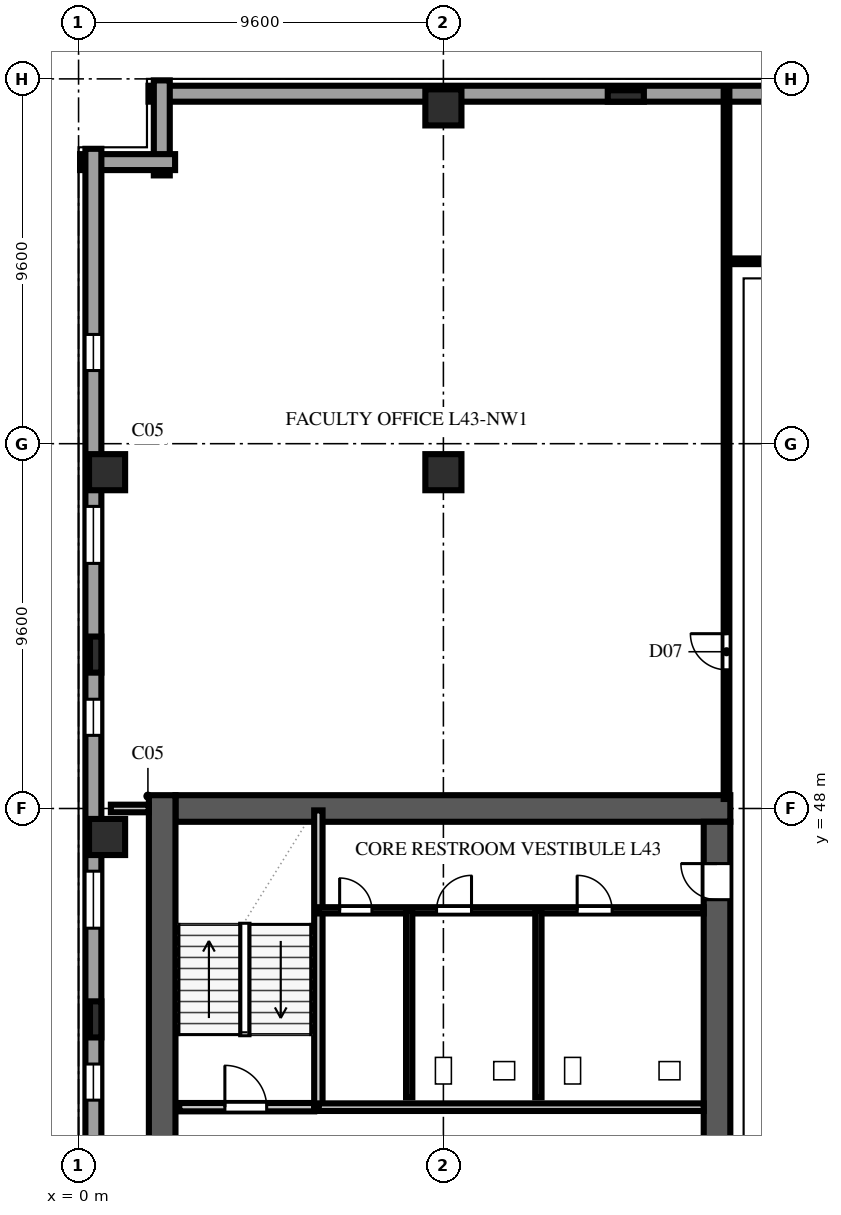
"""IFC4 building model, lengths in metres.
Left out: names, types, materials, properties, quantities, classifications, styles, units other than length and angle.
Written with IfcOpenShell. Run it as: python <this file> out.ifc"""

import sys

from ifc_helpers import new_model, si_unit, direction, frame, frame_2d, origin, origin_2d, place, context, subcontext, project, spatial, rectangle, extrude, element, fill, save


model = new_model("IFC4")
c1 = context("Model", 3, precision=1e-05, world=origin(), true_north=direction((0.0, 1.0)))
c2 = subcontext(c1, "Body", "Model", "MODEL_VIEW")
j1 = project(units=[si_unit("LENGTHUNIT", "METRE"), si_unit("PLANEANGLEUNIT", "RADIAN")], contexts=[c1])
p1 = place(None, origin())
s1 = spatial("IfcSite", under=j1, at=p1, CompositionType="ELEMENT")
p2 = place(p1, origin())
s2 = spatial("IfcBuilding", under=s1, at=p2, CompositionType="ELEMENT")
p3 = place(p2, frame((0.0, 0.0, 171.2)))
s3 = spatial("IfcBuildingStorey", under=s2, at=p3, CompositionType="ELEMENT", Elevation=171.2)
p4 = place(p3, frame((2.55, 48.0, 0.0), z_axis=(0.0, 0.0, 1.0), x_axis=(1.0, 0.0, 0.0)))
e1 = element("IfcWall", 1, at=p4, inside=s3, PredefinedType="SHEAR", context=c2, shape_type="SweptSolid", body=[
    extrude(rectangle(XDim=14.6, YDim=0.7, at=frame_2d((7.3, 0.0))), origin(), (0.0, 0.0, 1.0), 3.54),
])
p5 = place(p3, frame((2.2, 9.25, 0.0), z_axis=(0.0, 0.0, 1.0), x_axis=(0.0, 1.0, 0.0)))
e2 = element("IfcWall", 2, at=p5, inside=s3, PredefinedType="SHEAR", context=c2, shape_type="SweptSolid", body=[
    extrude(rectangle(XDim=39.1, YDim=0.7, at=frame_2d((19.55, 0.0))), origin(), (0.0, 0.0, 1.0), 3.54),
])
p6 = place(p3, frame((16.8, 36.4, 0.0), z_axis=(0.0, 0.0, 1.0), x_axis=(0.0, 1.0, 0.0)))
e3 = element("IfcWall", 3, at=p6, inside=s3, PredefinedType="SHEAR", context=c2, shape_type="SweptSolid", body=[
    extrude(rectangle(XDim=11.25, YDim=0.7, at=frame_2d((5.625, 0.0))), origin(), (0.0, 0.0, 1.0), 3.54),
])
p7 = place(p6, frame((9.2, 0.0, 0.0)))
e4 = element("IfcOpeningElement", 4, at=p7, cuts=e3, PredefinedType="OPENING", context=c2, shape_type="SweptSolid", body=[
    extrude(rectangle(XDim=0.95, YDim=2.15, at=frame_2d((0.475, 1.075))), frame((0.0, 0.362, 0.0), z_axis=(0.0, -1.0, 0.0), x_axis=(1.0, 0.0, 0.0)), (0.0, 0.0, 1.0), 0.724),
])
for number, where, z_axis, x_axis in (
    (5, (0.75, 47.25, 0.0), (0.0, 0.0, 1.0), (1.0, 0.0, 0.0)),
    (6, (0.75, 56.85, 0.0), (0.0, 0.0, 1.0), (1.0, 0.0, 0.0)),
    (7, (9.6, 56.85, 0.0), (0.0, 0.0, 1.0), (1.0, 0.0, 0.0)),
    (8, (9.6, 66.45, 0.0), (0.0, 0.0, 1.0), (1.0, 0.0, 0.0)),
):
    element("IfcColumn", number, at=place(p3, frame(where, z_axis=z_axis, x_axis=x_axis)), inside=s3, PredefinedType="COLUMN", context=c2, shape_type="SweptSolid", body=[
        extrude(rectangle(XDim=0.95, YDim=0.95, at=origin_2d()), origin(), (0.0, 0.0, 1.0), 3.8),
    ])
for number, where, z_axis, x_axis in (
    (9, (0.45, 42.45, 0.0), (0.0, 0.0, 1.0), (0.0, 1.0, 0.0)),
    (10, (0.45, 52.05, 0.0), (0.0, 0.0, 1.0), (0.0, 1.0, 0.0)),
    (11, (14.4, 66.75, 0.0), (0.0, 0.0, 1.0), (1.0, 0.0, 0.0)),
):
    element("IfcColumn", number, at=place(p3, frame(where, z_axis=z_axis, x_axis=x_axis)), inside=s3, PredefinedType="PILASTER", context=c2, shape_type="SweptSolid", body=[
        extrude(rectangle(XDim=0.95, YDim=0.3, at=origin_2d()), origin(), (0.0, 0.0, 1.0), 3.8),
    ])
p8 = place(p3, frame((36.56, 66.81, 0.0), z_axis=(0.0, 0.0, 1.0), x_axis=(-1.0, 0.0, 0.0)))
e12 = element("IfcWall", 12, at=p8, inside=s3, PredefinedType="SOLIDWALL", context=c2, shape_type="SweptSolid", body=[
    extrude(rectangle(XDim=34.72, YDim=0.42, at=frame_2d((17.36, 0.0))), origin(), (0.0, 0.0, 1.0), 3.54),
])
p9 = place(p8, frame((4.885, 0.0, 0.9)))
e13 = element("IfcOpeningElement", 13, at=p9, cuts=e12, PredefinedType="OPENING", context=c2, shape_type="SweptSolid", body=[
    extrude(rectangle(XDim=0.95, YDim=1.85, at=frame_2d((0.475, 0.925))), frame((0.0, 0.222, 0.0), z_axis=(0.0, -1.0, 0.0), x_axis=(1.0, 0.0, 0.0)), (0.0, 0.0, 1.0), 0.444),
])
p10 = place(p8, frame((9.41, 0.0, 0.9)))
e14 = element("IfcOpeningElement", 14, at=p10, cuts=e12, PredefinedType="OPENING", context=c2, shape_type="SweptSolid", body=[
    extrude(rectangle(XDim=1.5, YDim=1.85, at=frame_2d((0.75, 0.925))), frame((0.0, 0.222, 0.0), z_axis=(0.0, -1.0, 0.0), x_axis=(1.0, 0.0, 0.0)), (0.0, 0.0, 1.0), 0.444),
])
p11 = place(p8, frame((14.485, 0.0, 0.9)))
e15 = element("IfcOpeningElement", 15, at=p11, cuts=e12, PredefinedType="OPENING", context=c2, shape_type="SweptSolid", body=[
    extrude(rectangle(XDim=0.95, YDim=1.85, at=frame_2d((0.475, 0.925))), frame((0.0, 0.222, 0.0), z_axis=(0.0, -1.0, 0.0), x_axis=(1.0, 0.0, 0.0)), (0.0, 0.0, 1.0), 0.444),
])
for number, where, z_axis, x_axis in (
    (16, (2.19, 67.16, 0.0), (0.0, 0.0, 1.0), (0.0, -1.0, 0.0)),
    (17, (2.54, 65.01, 0.0), (0.0, 0.0, 1.0), (-1.0, 0.0, 0.0)),
):
    element("IfcWall", number, at=place(p3, frame(where, z_axis=z_axis, x_axis=x_axis)), inside=s3, PredefinedType="SOLIDWALL", context=c2, shape_type="SweptSolid", body=[
        extrude(rectangle(XDim=2.5, YDim=0.42, at=frame_2d((1.25, 0.0))), origin(), (0.0, 0.0, 1.0), 3.54),
    ])
p12 = place(p3, frame((0.39, 65.36, 0.0), z_axis=(0.0, 0.0, 1.0), x_axis=(0.0, -1.0, 0.0)))
e18 = element("IfcWall", 18, at=p12, inside=s3, PredefinedType="SOLIDWALL", context=c2, shape_type="SweptSolid", body=[
    extrude(rectangle(XDim=63.52, YDim=0.42, at=frame_2d((31.76, 0.0))), origin(), (0.0, 0.0, 1.0), 3.54),
])
p13 = place(p12, frame((4.885, 0.0, 0.9)))
e19 = element("IfcOpeningElement", 19, at=p13, cuts=e18, PredefinedType="OPENING", context=c2, shape_type="SweptSolid", body=[
    extrude(rectangle(XDim=0.95, YDim=1.85, at=frame_2d((0.475, 0.925))), frame((0.0, 0.222, 0.0), z_axis=(0.0, -1.0, 0.0), x_axis=(1.0, 0.0, 0.0)), (0.0, 0.0, 1.0), 0.444),
])
p14 = place(p12, frame((9.41, 0.0, 0.9)))
e20 = element("IfcOpeningElement", 20, at=p14, cuts=e18, PredefinedType="OPENING", context=c2, shape_type="SweptSolid", body=[
    extrude(rectangle(XDim=1.5, YDim=1.85, at=frame_2d((0.75, 0.925))), frame((0.0, 0.222, 0.0), z_axis=(0.0, -1.0, 0.0), x_axis=(1.0, 0.0, 0.0)), (0.0, 0.0, 1.0), 0.444),
])
p15 = place(p12, frame((14.485, 0.0, 0.9)))
e21 = element("IfcOpeningElement", 21, at=p15, cuts=e18, PredefinedType="OPENING", context=c2, shape_type="SweptSolid", body=[
    extrude(rectangle(XDim=0.95, YDim=1.85, at=frame_2d((0.475, 0.925))), frame((0.0, 0.222, 0.0), z_axis=(0.0, -1.0, 0.0), x_axis=(1.0, 0.0, 0.0)), (0.0, 0.0, 1.0), 0.444),
])
p16 = place(p12, frame((19.01, 0.0, 0.9)))
e22 = element("IfcOpeningElement", 22, at=p16, cuts=e18, PredefinedType="OPENING", context=c2, shape_type="SweptSolid", body=[
    extrude(rectangle(XDim=1.5, YDim=1.85, at=frame_2d((0.75, 0.925))), frame((0.0, 0.222, 0.0), z_axis=(0.0, -1.0, 0.0), x_axis=(1.0, 0.0, 0.0)), (0.0, 0.0, 1.0), 0.444),
])
p17 = place(p12, frame((24.085, 0.0, 0.9)))
e23 = element("IfcOpeningElement", 23, at=p17, cuts=e18, PredefinedType="OPENING", context=c2, shape_type="SweptSolid", body=[
    extrude(rectangle(XDim=0.95, YDim=1.85, at=frame_2d((0.475, 0.925))), frame((0.0, 0.222, 0.0), z_axis=(0.0, -1.0, 0.0), x_axis=(1.0, 0.0, 0.0)), (0.0, 0.0, 1.0), 0.444),
])
p18 = place(p12, frame((28.61, 0.0, 0.9)))
e24 = element("IfcOpeningElement", 24, at=p18, cuts=e18, PredefinedType="OPENING", context=c2, shape_type="SweptSolid", body=[
    extrude(rectangle(XDim=1.5, YDim=1.85, at=frame_2d((0.75, 0.925))), frame((0.0, 0.222, 0.0), z_axis=(0.0, -1.0, 0.0), x_axis=(1.0, 0.0, 0.0)), (0.0, 0.0, 1.0), 0.444),
])
p19 = place(p12, frame((33.685, 0.0, 0.9)))
e25 = element("IfcOpeningElement", 25, at=p19, cuts=e18, PredefinedType="OPENING", context=c2, shape_type="SweptSolid", body=[
    extrude(rectangle(XDim=0.95, YDim=1.85, at=frame_2d((0.475, 0.925))), frame((0.0, 0.222, 0.0), z_axis=(0.0, -1.0, 0.0), x_axis=(1.0, 0.0, 0.0)), (0.0, 0.0, 1.0), 0.444),
])
p20 = place(p12, frame((38.21, 0.0, 0.9)))
e26 = element("IfcOpeningElement", 26, at=p20, cuts=e18, PredefinedType="OPENING", context=c2, shape_type="SweptSolid", body=[
    extrude(rectangle(XDim=1.5, YDim=1.85, at=frame_2d((0.75, 0.925))), frame((0.0, 0.222, 0.0), z_axis=(0.0, -1.0, 0.0), x_axis=(1.0, 0.0, 0.0)), (0.0, 0.0, 1.0), 0.444),
])
p21 = place(p12, frame((43.285, 0.0, 0.9)))
e27 = element("IfcOpeningElement", 27, at=p21, cuts=e18, PredefinedType="OPENING", context=c2, shape_type="SweptSolid", body=[
    extrude(rectangle(XDim=0.95, YDim=1.85, at=frame_2d((0.475, 0.925))), frame((0.0, 0.222, 0.0), z_axis=(0.0, -1.0, 0.0), x_axis=(1.0, 0.0, 0.0)), (0.0, 0.0, 1.0), 0.444),
])
p22 = place(p12, frame((47.81, 0.0, 0.9)))
e28 = element("IfcOpeningElement", 28, at=p22, cuts=e18, PredefinedType="OPENING", context=c2, shape_type="SweptSolid", body=[
    extrude(rectangle(XDim=1.5, YDim=1.85, at=frame_2d((0.75, 0.925))), frame((0.0, 0.222, 0.0), z_axis=(0.0, -1.0, 0.0), x_axis=(1.0, 0.0, 0.0)), (0.0, 0.0, 1.0), 0.444),
])
p23 = place(p12, frame((52.885, 0.0, 0.9)))
e29 = element("IfcOpeningElement", 29, at=p23, cuts=e18, PredefinedType="OPENING", context=c2, shape_type="SweptSolid", body=[
    extrude(rectangle(XDim=0.95, YDim=1.85, at=frame_2d((0.475, 0.925))), frame((0.0, 0.222, 0.0), z_axis=(0.0, -1.0, 0.0), x_axis=(1.0, 0.0, 0.0)), (0.0, 0.0, 1.0), 0.444),
])
p24 = place(p12, frame((57.41, 0.0, 0.9)))
e30 = element("IfcOpeningElement", 30, at=p24, cuts=e18, PredefinedType="OPENING", context=c2, shape_type="SweptSolid", body=[
    extrude(rectangle(XDim=1.5, YDim=1.85, at=frame_2d((0.75, 0.925))), frame((0.0, 0.222, 0.0), z_axis=(0.0, -1.0, 0.0), x_axis=(1.0, 0.0, 0.0)), (0.0, 0.0, 1.0), 0.444),
])
p25 = place(p3, frame((2.65, 40.14, 0.0), z_axis=(0.0, 0.0, 1.0), x_axis=(1.0, 0.0, 0.0)))
e31 = element("IfcWall", 31, at=p25, inside=s3, PredefinedType="SOLIDWALL", context=c2, shape_type="SweptSolid", body=[
    extrude(rectangle(XDim=3.55, YDim=0.22, at=frame_2d((1.775, 0.0))), origin(), (0.0, 0.0, 1.0), 3.54),
])
p26 = place(p25, frame((1.2, 0.0, 0.0)))
e32 = element("IfcOpeningElement", 32, at=p26, cuts=e31, PredefinedType="OPENING", context=c2, shape_type="SweptSolid", body=[
    extrude(rectangle(XDim=1.1, YDim=2.2, at=frame_2d((0.55, 1.1))), frame((0.0, 0.122, 0.0), z_axis=(0.0, -1.0, 0.0), x_axis=(1.0, 0.0, 0.0)), (0.0, 0.0, 1.0), 0.244),
])
p27 = place(p3, frame((6.31, 40.14, 0.0), z_axis=(0.0, 0.0, 1.0), x_axis=(0.0, 1.0, 0.0)))
e33 = element("IfcWall", 33, at=p27, inside=s3, PredefinedType="SOLIDWALL", context=c2, shape_type="SweptSolid", body=[
    extrude(rectangle(XDim=7.81, YDim=0.22, at=frame_2d((3.905, 0.0))), origin(), (0.0, 0.0, 1.0), 3.54),
])
p28 = place(p3, frame((6.32, 40.14, 0.0), z_axis=(0.0, 0.0, 1.0), x_axis=(1.0, 0.0, 0.0)))
e34 = element("IfcWall", 34, at=p28, inside=s3, PredefinedType="SOLIDWALL", context=c2, shape_type="SweptSolid", body=[
    extrude(rectangle(XDim=10.13, YDim=0.2, at=frame_2d((5.065, 0.0))), origin(), (0.0, 0.0, 1.0), 3.54),
])
p29 = place(p3, frame((6.32, 45.32, 0.0), z_axis=(0.0, 0.0, 1.0), x_axis=(1.0, 0.0, 0.0)))
e35 = element("IfcWall", 35, at=p29, inside=s3, PredefinedType="PLUMBINGWALL", context=c2, shape_type="SweptSolid", body=[
    extrude(rectangle(XDim=10.13, YDim=0.165, at=frame_2d((5.065, 0.0))), origin(), (0.0, 0.0, 1.0), 3.54),
])
p30 = place(p29, frame((0.55, 0.0, 0.0)))
e36 = element("IfcOpeningElement", 36, at=p30, cuts=e35, PredefinedType="OPENING", context=c2, shape_type="SweptSolid", body=[
    extrude(rectangle(XDim=0.85, YDim=2.1, at=frame_2d((0.425, 1.05))), frame((0.0, 0.094, 0.0), z_axis=(0.0, -1.0, 0.0), x_axis=(1.0, 0.0, 0.0)), (0.0, 0.0, 1.0), 0.189),
])
p31 = place(p29, frame((3.1, 0.0, 0.0)))
e37 = element("IfcOpeningElement", 37, at=p31, cuts=e35, PredefinedType="OPENING", context=c2, shape_type="SweptSolid", body=[
    extrude(rectangle(XDim=0.92, YDim=2.15, at=frame_2d((0.46, 1.075))), frame((0.0, 0.094, 0.0), z_axis=(0.0, -1.0, 0.0), x_axis=(1.0, 0.0, 0.0)), (0.0, 0.0, 1.0), 0.189),
])
p32 = place(p29, frame((6.8, 0.0, 0.0)))
e38 = element("IfcOpeningElement", 38, at=p32, cuts=e35, PredefinedType="OPENING", context=c2, shape_type="SweptSolid", body=[
    extrude(rectangle(XDim=0.92, YDim=2.15, at=frame_2d((0.46, 1.075))), frame((0.0, 0.094, 0.0), z_axis=(0.0, -1.0, 0.0), x_axis=(1.0, 0.0, 0.0)), (0.0, 0.0, 1.0), 0.189),
])
for number, where, z_axis, x_axis in (
    (39, (8.7, 40.4, 0.0), (0.0, 0.0, 1.0), (0.0, 1.0, 0.0)),
    (40, (12.1, 40.4, 0.0), (0.0, 0.0, 1.0), (0.0, 1.0, 0.0)),
):
    element("IfcWall", number, at=place(p3, frame(where, z_axis=z_axis, x_axis=x_axis)), inside=s3, PredefinedType="PLUMBINGWALL", context=c2, shape_type="SweptSolid", body=[
        extrude(rectangle(XDim=4.92, YDim=0.165, at=frame_2d((2.46, 0.0))), origin(), (0.0, 0.0, 1.0), 3.54),
    ])
p33 = place(p3, frame((0.85, 48.0, 0.0), z_axis=(0.0, 0.0, 1.0), x_axis=(1.0, 0.0, 0.0)))
e41 = element("IfcWall", 41, at=p33, inside=s3, PredefinedType="SOLIDWALL", context=c2, shape_type="SweptSolid", body=[
    extrude(rectangle(XDim=0.995, YDim=0.2, at=frame_2d((0.498, 0.0))), origin(), (0.0, 0.0, 1.0), 3.54),
])
p34 = place(p3, frame((17.05, 62.4, 0.0), z_axis=(0.0, 0.0, 1.0), x_axis=(1.0, 0.0, 0.0)))
e42 = element("IfcWall", 42, at=p34, inside=s3, PredefinedType="PARTITIONING", context=c2, shape_type="SweptSolid", body=[
    extrude(rectangle(XDim=2.15, YDim=0.15, at=frame_2d((1.075, 0.0))), origin(), (0.0, 0.0, 1.0), 3.54),
])
p35 = place(p3, frame((17.05, 48.25, 0.0), z_axis=(0.0, 0.0, 1.0), x_axis=(0.0, 1.0, 0.0)))
e43 = element("IfcWall", 43, at=p35, inside=s3, PredefinedType="PARTITIONING", context=c2, shape_type="SweptSolid", body=[
    extrude(rectangle(XDim=18.73, YDim=0.15, at=frame_2d((9.365, 0.0))), origin(), (0.0, 0.0, 1.0), 3.54),
])
p36 = place(p35, frame((3.4, 0.0, 0.0)))
e44 = element("IfcOpeningElement", 44, at=p36, cuts=e43, PredefinedType="OPENING", context=c2, shape_type="SweptSolid", body=[
    extrude(rectangle(XDim=0.95, YDim=2.15, at=frame_2d((0.475, 1.075))), frame((0.0, 0.087, 0.0), z_axis=(0.0, -1.0, 0.0), x_axis=(1.0, 0.0, 0.0)), (0.0, 0.0, 1.0), 0.174),
])
p37 = place(p13, origin())
e45 = element("IfcWindow", 45, at=p37, inside=s3, PartitioningType="SINGLE_PANEL", PredefinedType="WINDOW", context=c2, shape_type="SweptSolid", body=[
    extrude(rectangle(XDim=0.95, YDim=1.85, at=frame_2d((0.475, 0.925))), frame((0.0, 0.11, 0.0), z_axis=(0.0, -1.0, 0.0), x_axis=(1.0, 0.0, 0.0)), (0.0, 0.0, 1.0), 0.06),
])
fill(e19, e45)
p38 = place(p14, origin())
e46 = element("IfcWindow", 46, at=p38, inside=s3, PartitioningType="DOUBLE_PANEL_VERTICAL", PredefinedType="WINDOW", context=c2, shape_type="SweptSolid", body=[
    extrude(rectangle(XDim=1.5, YDim=1.85, at=frame_2d((0.75, 0.925))), frame((0.0, 0.11, 0.0), z_axis=(0.0, -1.0, 0.0), x_axis=(1.0, 0.0, 0.0)), (0.0, 0.0, 1.0), 0.06),
])
fill(e20, e46)
p39 = place(p15, origin())
e47 = element("IfcWindow", 47, at=p39, inside=s3, PartitioningType="SINGLE_PANEL", PredefinedType="WINDOW", context=c2, shape_type="SweptSolid", body=[
    extrude(rectangle(XDim=0.95, YDim=1.85, at=frame_2d((0.475, 0.925))), frame((0.0, 0.11, 0.0), z_axis=(0.0, -1.0, 0.0), x_axis=(1.0, 0.0, 0.0)), (0.0, 0.0, 1.0), 0.06),
])
fill(e21, e47)
p40 = place(p16, origin())
e48 = element("IfcWindow", 48, at=p40, inside=s3, PartitioningType="DOUBLE_PANEL_VERTICAL", PredefinedType="WINDOW", context=c2, shape_type="SweptSolid", body=[
    extrude(rectangle(XDim=1.5, YDim=1.85, at=frame_2d((0.75, 0.925))), frame((0.0, 0.11, 0.0), z_axis=(0.0, -1.0, 0.0), x_axis=(1.0, 0.0, 0.0)), (0.0, 0.0, 1.0), 0.06),
])
fill(e22, e48)
p41 = place(p17, origin())
e49 = element("IfcWindow", 49, at=p41, inside=s3, PartitioningType="SINGLE_PANEL", PredefinedType="WINDOW", context=c2, shape_type="SweptSolid", body=[
    extrude(rectangle(XDim=0.95, YDim=1.85, at=frame_2d((0.475, 0.925))), frame((0.0, 0.11, 0.0), z_axis=(0.0, -1.0, 0.0), x_axis=(1.0, 0.0, 0.0)), (0.0, 0.0, 1.0), 0.06),
])
fill(e23, e49)
p42 = place(p26, origin())
e50 = element("IfcDoor", 50, at=p42, inside=s3, OperationType="SINGLE_SWING_LEFT", PredefinedType="DOOR", context=c2, shape_type="SweptSolid", body=[
    extrude(rectangle(XDim=1.1, YDim=2.2, at=frame_2d((0.55, 1.1))), frame((0.0, 0.025, 0.0), z_axis=(0.0, -1.0, 0.0), x_axis=(1.0, 0.0, 0.0)), (0.0, 0.0, 1.0), 0.05),
])
fill(e32, e50)
p43 = place(p7, origin())
e51 = element("IfcDoor", 51, at=p43, inside=s3, OperationType="SINGLE_SWING_RIGHT", PredefinedType="DOOR", context=c2, shape_type="SweptSolid", body=[
    extrude(rectangle(XDim=0.95, YDim=2.15, at=frame_2d((0.475, 1.075))), frame((0.0, 0.025, 0.0), z_axis=(0.0, -1.0, 0.0), x_axis=(1.0, 0.0, 0.0)), (0.0, 0.0, 1.0), 0.05),
])
fill(e4, e51)
p44 = place(p30, origin())
e52 = element("IfcDoor", 52, at=p44, inside=s3, OperationType="SINGLE_SWING_LEFT", PredefinedType="DOOR", context=c2, shape_type="SweptSolid", body=[
    extrude(rectangle(XDim=0.85, YDim=2.1, at=frame_2d((0.425, 1.05))), frame((0.0, 0.025, 0.0), z_axis=(0.0, -1.0, 0.0), x_axis=(1.0, 0.0, 0.0)), (0.0, 0.0, 1.0), 0.05),
])
fill(e36, e52)
p45 = place(p31, origin())
e53 = element("IfcDoor", 53, at=p45, inside=s3, OperationType="SINGLE_SWING_RIGHT", PredefinedType="DOOR", context=c2, shape_type="SweptSolid", body=[
    extrude(rectangle(XDim=0.92, YDim=2.15, at=frame_2d((0.46, 1.075))), frame((0.0, 0.025, 0.0), z_axis=(0.0, -1.0, 0.0), x_axis=(1.0, 0.0, 0.0)), (0.0, 0.0, 1.0), 0.05),
])
fill(e37, e53)
p46 = place(p32, origin())
e54 = element("IfcDoor", 54, at=p46, inside=s3, OperationType="SINGLE_SWING_LEFT", PredefinedType="DOOR", context=c2, shape_type="SweptSolid", body=[
    extrude(rectangle(XDim=0.92, YDim=2.15, at=frame_2d((0.46, 1.075))), frame((0.0, 0.025, 0.0), z_axis=(0.0, -1.0, 0.0), x_axis=(1.0, 0.0, 0.0)), (0.0, 0.0, 1.0), 0.05),
])
fill(e38, e54)
p47 = place(p36, origin())
e55 = element("IfcDoor", 55, at=p47, inside=s3, OperationType="SINGLE_SWING_RIGHT", PredefinedType="DOOR", context=c2, shape_type="SweptSolid", body=[
    extrude(rectangle(XDim=0.95, YDim=2.15, at=frame_2d((0.475, 1.075))), frame((0.0, 0.025, 0.0), z_axis=(0.0, -1.0, 0.0), x_axis=(1.0, 0.0, 0.0)), (0.0, 0.0, 1.0), 0.05),
])
fill(e44, e55)
save(model, sys.argv[1])
